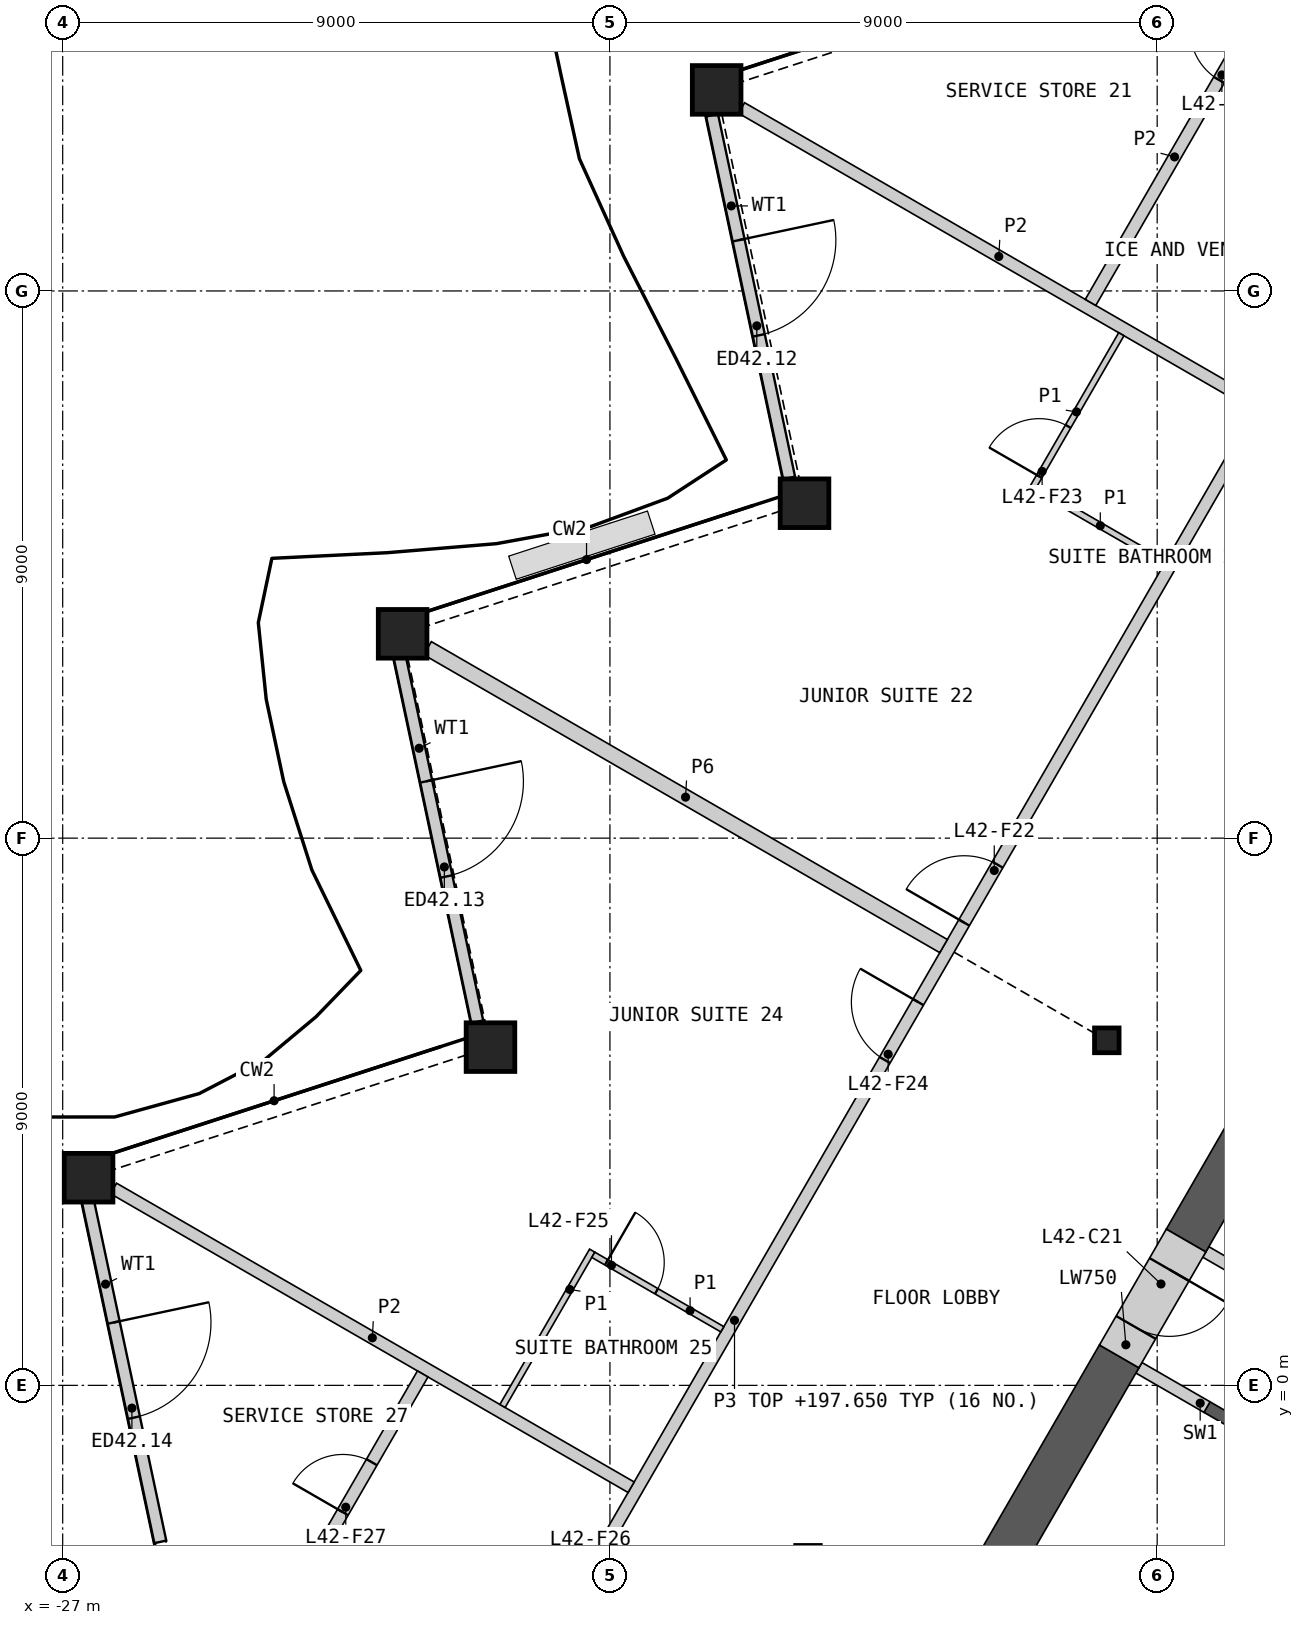
"""IFC4 building model, lengths in metres.
Left out: names, types, materials, properties, quantities, classifications, styles, units other than length and angle.
Written with IfcOpenShell. Run it as: python <this file> out.ifc"""

import sys

from ifc_helpers import new_model, si_unit, direction, frame, frame_2d, origin, origin_2d, place, context, subcontext, project, spatial, polyline, rectangle, hollow_rectangle, i_section, outline, extrude, element, fill, save


model = new_model("IFC4")
c1 = context("Model", 3, precision=1e-05, world=origin(), true_north=direction((0.0, 1.0)))
c2 = subcontext(c1, "Body", "Model", "MODEL_VIEW")
j1 = project(units=[si_unit("LENGTHUNIT", "METRE"), si_unit("PLANEANGLEUNIT", "RADIAN")], contexts=[c1])
p1 = place(None, origin())
s1 = spatial("IfcSite", under=j1, at=p1, CompositionType="ELEMENT")
p2 = place(p1, origin())
s2 = spatial("IfcBuilding", under=s1, at=p2, CompositionType="ELEMENT")
p3 = place(p2, frame((0.0, 0.0, 194.4)))
s3 = spatial("IfcBuildingStorey", under=s2, at=p3, CompositionType="ELEMENT", Elevation=194.4)
for number, where, z_axis, x_axis in (
    (1, (-16.245, 21.306, 0.0), (0.0, 0.0, 1.0), (1.0, 0.0, 0.0)),
    (2, (-14.8, 14.508, 0.0), (0.0, 0.0, 1.0), (1.0, 0.0, 0.0)),
    (3, (-21.409, 12.361, 0.0), (0.0, 0.0, 1.0), (1.0, 0.0, 0.0)),
    (4, (-19.965, 5.563, 0.0), (0.0, 0.0, 1.0), (1.0, 0.0, 0.0)),
    (5, (-26.574, 3.415, 0.0), (0.0, 0.0, 1.0), (1.0, 0.0, 0.0)),
):
    element("IfcColumn", number, at=place(p3, frame(where, z_axis=z_axis, x_axis=x_axis)), inside=s3, PredefinedType="COLUMN", context=c2, shape_type="SweptSolid", body=[
        extrude(hollow_rectangle(XDim=0.8, YDim=0.8, WallThickness=0.05, at=origin_2d()), origin(), (0.0, 0.0, 1.0), 3.6),
    ])
p4 = place(p3, frame((-9.828, 5.675, 0.0), z_axis=(0.0, 0.0, 1.0), x_axis=(1.0, 0.0, 0.0)))
e6 = element("IfcColumn", 6, at=p4, inside=s3, PredefinedType="COLUMN", context=c2, shape_type="SweptSolid", body=[
    extrude(i_section(OverallWidth=0.404, OverallDepth=0.407, WebThickness=0.027, FlangeThickness=0.044, at=origin_2d()), origin(), (0.0, 0.0, 1.0), 3.6),
])
p5 = place(p3, frame((-16.321, 20.89, 0.0), z_axis=(0.0, 0.0, 1.0), x_axis=(0.207912864597, -0.978147351238, 0.0)))
e7 = element("IfcWall", 7, at=p5, inside=s3, PredefinedType="SOLIDWALL", context=c2, shape_type="SweptSolid", body=[
    extrude(rectangle(XDim=6.098, YDim=0.2, at=frame_2d((3.049, 0.0))), origin(), (0.0, 0.0, 1.0), 2.701),
])
p6 = place(p5, frame((2.101, 0.0, 0.0)))
e8 = element("IfcOpeningElement", 8, at=p6, cuts=e7, PredefinedType="OPENING", context=c2, shape_type="SweptSolid", body=[
    extrude(rectangle(XDim=1.6, YDim=2.4, at=frame_2d((0.8, 1.2))), frame((0.0, 0.11, 0.0), z_axis=(0.0, -1.0, 0.0), x_axis=(1.0, 0.0, 0.0)), (0.0, 0.0, 1.0), 0.22),
])
p7 = place(p3, frame((-21.457, 11.978, 0.0), z_axis=(0.0, 0.0, 1.0), x_axis=(0.207930174887, -0.978143671641, 0.0)))
e9 = element("IfcWall", 9, at=p7, inside=s3, PredefinedType="SOLIDWALL", context=c2, shape_type="SweptSolid", body=[
    extrude(rectangle(XDim=6.133, YDim=0.2, at=frame_2d((3.066, 0.0))), origin(), (0.0, 0.0, 1.0), 2.701),
])
p8 = place(p7, frame((2.089, 0.0, 0.0)))
e10 = element("IfcOpeningElement", 10, at=p8, cuts=e9, PredefinedType="OPENING", context=c2, shape_type="SweptSolid", body=[
    extrude(rectangle(XDim=1.6, YDim=2.4, at=frame_2d((0.8, 1.2))), frame((0.0, 0.11, 0.0), z_axis=(0.0, -1.0, 0.0), x_axis=(1.0, 0.0, 0.0)), (0.0, 0.0, 1.0), 0.22),
])
p9 = place(p3, frame((-26.595, 3.078, 0.0), z_axis=(0.0, 0.0, 1.0), x_axis=(0.207907263894, -0.978148541695, 0.0)))
e11 = element("IfcWall", 11, at=p9, inside=s3, PredefinedType="SOLIDWALL", context=c2, shape_type="SweptSolid", body=[
    extrude(rectangle(XDim=5.779, YDim=0.2, at=frame_2d((2.889, 0.0))), origin(), (0.0, 0.0, 1.0), 2.701),
])
p10 = place(p9, frame((2.089, 0.0, 0.0)))
e12 = element("IfcOpeningElement", 12, at=p10, cuts=e11, PredefinedType="OPENING", context=c2, shape_type="SweptSolid", body=[
    extrude(rectangle(XDim=1.6, YDim=2.4, at=frame_2d((0.8, 1.2))), frame((0.0, 0.11, 0.0), z_axis=(0.0, -1.0, 0.0), x_axis=(1.0, 0.0, 0.0)), (0.0, 0.0, 1.0), 0.22),
])
p11 = place(p3, origin())
e13 = element("IfcWall", 13, at=p11, inside=s3, PredefinedType="SHEAR", context=c2, shape_type="SweptSolid", body=[
    extrude(outline(polyline([(-6.061, -1.697), (-8.231, -0.444), (-8.131, -0.271), (-5.96, -1.524), (-6.061, -1.697)])), origin(), (0.0, 0.0, 1.0), 3.25),
])
for number, where, z_axis, x_axis in (
    (14, (-7.081, 1.548, 0.0), (0.0, 0.0, 1.0), (-0.866, 0.5, 0.0)),
    (15, (-8.181, -0.357, 0.0), (0.0, 0.0, 1.0), (-0.866, 0.5, 0.0)),
):
    element("IfcWall", number, at=place(p3, frame(where, z_axis=z_axis, x_axis=x_axis)), inside=s3, PredefinedType="SHEAR", context=c2, shape_type="SweptSolid", body=[
        extrude(rectangle(XDim=1.293, YDim=0.2, at=frame_2d((0.646, 0.0))), origin(), (0.0, 0.0, 1.0), 3.25),
    ])
p12 = place(p3, origin())
e16 = element("IfcWall", 16, at=p12, inside=s3, PredefinedType="SHEAR", context=c2, shape_type="SweptSolid", body=[
    extrude(outline(polyline([(-5.307, -1.281), (-10.374, -4.206), (-10.032, -4.298), (-5.182, -1.498), (-5.307, -1.281)])), origin(), (0.0, 0.0, 1.0), 3.25),
])
p13 = place(p3, frame((-4.95, 8.574, 0.0), z_axis=(0.0, 0.0, 1.0), x_axis=(-0.499987463267, -0.866032641749, 0.0)))
e17 = element("IfcWall", 17, at=p13, inside=s3, PredefinedType="SHEAR", context=c2, shape_type="SweptSolid", body=[
    extrude(rectangle(XDim=7.151, YDim=0.75, at=frame_2d((3.575, 0.0))), origin(), (0.0, 0.0, 1.0), 3.25),
])
p14 = place(p3, frame((-9.625, 0.477, 0.0), z_axis=(0.0, 0.0, 1.0), x_axis=(-0.499951145694, -0.866053607994, 0.0)))
e18 = element("IfcWall", 18, at=p14, inside=s3, PredefinedType="SHEAR", context=c2, shape_type="SweptSolid", body=[
    extrude(rectangle(XDim=3.851, YDim=0.75, at=frame_2d((1.925, 0.0))), origin(), (0.0, 0.0, 1.0), 3.25),
])
p15 = place(p3, frame((-8.525, 2.382, 0.0), z_axis=(0.0, 0.0, 1.0), x_axis=(-0.500077893725, -0.86598042715, 0.0)))
e19 = element("IfcWall", 19, at=p15, inside=s3, PredefinedType="SHEAR", context=c2, shape_type="SweptSolid", body=[
    extrude(rectangle(XDim=2.2, YDim=0.75, at=frame_2d((1.1, 0.0))), origin(), (0.0, 0.0, 1.0), 3.25),
])
p16 = place(p15, frame((0.55, 0.0, 0.0)))
e20 = element("IfcOpeningElement", 20, at=p16, cuts=e19, PredefinedType="OPENING", context=c2, shape_type="SweptSolid", body=[
    extrude(rectangle(XDim=1.1, YDim=2.1, at=frame_2d((0.55, 1.05))), frame((0.0, 0.385, 0.0), z_axis=(0.0, -1.0, 0.0), x_axis=(1.0, 0.0, 0.0)), (0.0, 0.0, 1.0), 0.77),
])
p17 = place(p3, frame((-19.476, -5.035, 0.0), z_axis=(0.0, 0.0, 1.0), x_axis=(0.500000757641, 0.86602496636, 0.0)))
e21 = element("IfcWall", 21, at=p17, inside=s3, PredefinedType="PARTITIONING", context=c2, shape_type="SweptSolid", body=[
    extrude(rectangle(XDim=28.198, YDim=0.2, at=frame_2d((14.099, 0.0))), origin(), (0.0, 0.0, 1.0), 3.25),
])
p18 = place(p17, frame((25.796, 0.0, 0.0)))
e22 = element("IfcOpeningElement", 22, at=p18, cuts=e21, PredefinedType="OPENING", context=c2, shape_type="SweptSolid", body=[
    extrude(rectangle(XDim=0.95, YDim=2.1, at=frame_2d((0.475, 1.05))), frame((0.0, 0.11, 0.0), z_axis=(0.0, -1.0, 0.0), x_axis=(1.0, 0.0, 0.0)), (0.0, 0.0, 1.0), 0.22),
])
p19 = place(p17, frame((14.603, 0.0, 0.0)))
e23 = element("IfcOpeningElement", 23, at=p19, cuts=e21, PredefinedType="OPENING", context=c2, shape_type="SweptSolid", body=[
    extrude(rectangle(XDim=1.1, YDim=2.1, at=frame_2d((0.55, 1.05))), frame((0.0, 0.11, 0.0), z_axis=(0.0, -1.0, 0.0), x_axis=(1.0, 0.0, 0.0)), (0.0, 0.0, 1.0), 0.22),
])
p20 = place(p17, frame((11.993, 0.0, 0.0)))
e24 = element("IfcOpeningElement", 24, at=p20, cuts=e21, PredefinedType="OPENING", context=c2, shape_type="SweptSolid", body=[
    extrude(rectangle(XDim=1.1, YDim=2.1, at=frame_2d((0.55, 1.05))), frame((0.0, 0.11, 0.0), z_axis=(0.0, -1.0, 0.0), x_axis=(1.0, 0.0, 0.0)), (0.0, 0.0, 1.0), 0.22),
])
p21 = place(p17, frame((1.452, 0.0, 0.0)))
e25 = element("IfcOpeningElement", 25, at=p21, cuts=e21, PredefinedType="OPENING", context=c2, shape_type="SweptSolid", body=[
    extrude(rectangle(XDim=0.95, YDim=2.1, at=frame_2d((0.475, 1.05))), frame((0.0, 0.11, 0.0), z_axis=(0.0, -1.0, 0.0), x_axis=(1.0, 0.0, 0.0)), (0.0, 0.0, 1.0), 0.22),
])
p22 = place(p3, frame((-21.0, 12.124, 0.0), z_axis=(0.0, 0.0, 1.0), x_axis=(0.866032905446, -0.499987006516, 0.0)))
e26 = element("IfcWall", 26, at=p22, inside=s3, PredefinedType="PARTITIONING", context=c2, shape_type="SweptSolid", body=[
    extrude(rectangle(XDim=9.799, YDim=0.25, at=frame_2d((4.899, 0.0))), origin(), (0.0, 0.0, 1.0), 2.404),
])
p23 = place(p3, frame((-11.021, 29.57, 0.0), z_axis=(0.0, 0.0, 1.0), x_axis=(0.478233946204, -0.878232482147, 0.0)))
e27 = element("IfcWall", 27, at=p23, inside=s3, PredefinedType="PARTITIONING", context=c2, shape_type="SweptSolid", body=[
    extrude(rectangle(XDim=11.596, YDim=0.2, at=frame_2d((5.798, 0.0))), origin(), (0.0, 0.0, 1.0), 2.404),
])
p24 = place(p3, frame((-26.164, 3.239, 0.0), z_axis=(0.0, 0.0, 1.0), x_axis=(0.866025932773, -0.499999083763, 0.0)))
e28 = element("IfcWall", 28, at=p24, inside=s3, PredefinedType="PARTITIONING", context=c2, shape_type="SweptSolid", body=[
    extrude(rectangle(XDim=9.83, YDim=0.2, at=frame_2d((4.915, 0.0))), origin(), (0.0, 0.0, 1.0), 2.404),
])
p25 = place(p3, frame((-15.835, 21.009, 0.0), z_axis=(0.0, 0.0, 1.0), x_axis=(0.866024525919, -0.500001520505, 0.0)))
e29 = element("IfcWall", 29, at=p25, inside=s3, PredefinedType="PARTITIONING", context=c2, shape_type="SweptSolid", body=[
    extrude(rectangle(XDim=9.769, YDim=0.2, at=frame_2d((4.885, 0.0))), origin(), (0.0, 0.0, 1.0), 2.404),
])
p26 = place(p3, frame((-24.045, -4.949, 0.0), z_axis=(0.0, 0.0, 1.0), x_axis=(0.500016988964, 0.866015594979, 0.0)))
e30 = element("IfcWall", 30, at=p26, inside=s3, PredefinedType="PARTITIONING", context=c2, shape_type="SweptSolid", body=[
    extrude(rectangle(XDim=5.931, YDim=0.2, at=frame_2d((2.966, 0.0))), origin(), (0.0, 0.0, 1.0), 2.404),
])
p27 = place(p26, frame((3.305, 0.0, 0.0)))
e31 = element("IfcOpeningElement", 31, at=p27, cuts=e30, PredefinedType="OPENING", context=c2, shape_type="SweptSolid", body=[
    extrude(rectangle(XDim=0.95, YDim=2.1, at=frame_2d((0.475, 1.05))), frame((0.0, 0.11, 0.0), z_axis=(0.0, -1.0, 0.0), x_axis=(1.0, 0.0, 0.0)), (0.0, 0.0, 1.0), 0.22),
])
p28 = place(p3, frame((-10.096, 17.811, 0.0), z_axis=(0.0, 0.0, 1.0), x_axis=(0.500015590807, 0.866016402241, 0.0)))
e32 = element("IfcWall", 32, at=p28, inside=s3, PredefinedType="PARTITIONING", context=c2, shape_type="SweptSolid", body=[
    extrude(rectangle(XDim=5.527, YDim=0.2, at=frame_2d((2.764, 0.0))), origin(), (0.0, 0.0, 1.0), 2.404),
])
p29 = place(p28, frame((4.225, 0.0, 0.0)))
e33 = element("IfcOpeningElement", 33, at=p29, cuts=e32, PredefinedType="OPENING", context=c2, shape_type="SweptSolid", body=[
    extrude(rectangle(XDim=0.95, YDim=2.1, at=frame_2d((0.475, 1.05))), frame((0.0, 0.11, 0.0), z_axis=(0.0, -1.0, 0.0), x_axis=(1.0, 0.0, 0.0)), (0.0, 0.0, 1.0), 0.22),
])
p30 = place(p3, frame((-11.065, 14.733, 0.0), z_axis=(0.0, 0.0, 1.0), x_axis=(0.500037662692, 0.866003658127, 0.0)))
e34 = element("IfcWall", 34, at=p30, inside=s3, PredefinedType="PARTITIONING", context=c2, shape_type="SweptSolid", body=[
    extrude(rectangle(XDim=2.95, YDim=0.1, at=frame_2d((1.475, 0.0))), origin(), (0.0, 0.0, 1.0), 2.404),
])
p31 = place(p30, frame((0.25, 0.0, 0.0)))
e35 = element("IfcOpeningElement", 35, at=p31, cuts=e34, PredefinedType="OPENING", context=c2, shape_type="SweptSolid", body=[
    extrude(rectangle(XDim=0.95, YDim=2.1, at=frame_2d((0.475, 1.05))), frame((0.0, 0.06, 0.0), z_axis=(0.0, -1.0, 0.0), x_axis=(1.0, 0.0, 0.0)), (0.0, 0.0, 1.0), 0.12),
])
p32 = place(p3, frame((-19.767, -0.339, 0.0), z_axis=(0.0, 0.0, 1.0), x_axis=(0.499939757307, 0.866060182126, 0.0)))
e36 = element("IfcWall", 36, at=p32, inside=s3, PredefinedType="PARTITIONING", context=c2, shape_type="SweptSolid", body=[
    extrude(rectangle(XDim=2.95, YDim=0.1, at=frame_2d((1.475, 0.0))), origin(), (0.0, 0.0, 1.0), 2.404),
])
p33 = place(p3, frame((-10.996, 14.752, 0.0), z_axis=(0.0, 0.0, 1.0), x_axis=(0.866014668023, -0.500018594424, 0.0)))
e37 = element("IfcWall", 37, at=p33, inside=s3, PredefinedType="PARTITIONING", context=c2, shape_type="SweptSolid", body=[
    extrude(rectangle(XDim=2.45, YDim=0.1, at=frame_2d((1.225, 0.0))), origin(), (0.0, 0.0, 1.0), 2.404),
])
p34 = place(p3, frame((-18.273, 2.147, 0.0), z_axis=(0.0, 0.0, 1.0), x_axis=(0.866014668023, -0.500018594424, 0.0)))
e38 = element("IfcWall", 38, at=p34, inside=s3, PredefinedType="PARTITIONING", context=c2, shape_type="SweptSolid", body=[
    extrude(rectangle(XDim=2.45, YDim=0.1, at=frame_2d((1.225, 0.0))), origin(), (0.0, 0.0, 1.0), 2.404),
])
p35 = place(p34, frame((0.25, 0.0, 0.0)))
e39 = element("IfcOpeningElement", 39, at=p35, cuts=e38, PredefinedType="OPENING", context=c2, shape_type="SweptSolid", body=[
    extrude(rectangle(XDim=0.95, YDim=2.1, at=frame_2d((0.475, 1.05))), frame((0.0, 0.06, 0.0), z_axis=(0.0, -1.0, 0.0), x_axis=(1.0, 0.0, 0.0)), (0.0, 0.0, 1.0), 0.12),
])
p36 = place(p6, origin())
e40 = element("IfcDoor", 40, at=p36, inside=s3, OperationType="DOUBLE_DOOR_SINGLE_SWING", PredefinedType="DOOR", context=c2, shape_type="SweptSolid", body=[
    extrude(rectangle(XDim=1.6, YDim=2.4, at=frame_2d((0.8, 1.2))), frame((0.0, 0.025, 0.0), z_axis=(0.0, -1.0, 0.0), x_axis=(1.0, 0.0, 0.0)), (0.0, 0.0, 1.0), 0.05),
])
fill(e8, e40)
p37 = place(p8, origin())
e41 = element("IfcDoor", 41, at=p37, inside=s3, OperationType="DOUBLE_DOOR_SINGLE_SWING", PredefinedType="DOOR", context=c2, shape_type="SweptSolid", body=[
    extrude(rectangle(XDim=1.6, YDim=2.4, at=frame_2d((0.8, 1.2))), frame((0.0, 0.025, 0.0), z_axis=(0.0, -1.0, 0.0), x_axis=(1.0, 0.0, 0.0)), (0.0, 0.0, 1.0), 0.05),
])
fill(e10, e41)
p38 = place(p10, origin())
e42 = element("IfcDoor", 42, at=p38, inside=s3, OperationType="DOUBLE_DOOR_SINGLE_SWING", PredefinedType="DOOR", context=c2, shape_type="SweptSolid", body=[
    extrude(rectangle(XDim=1.6, YDim=2.4, at=frame_2d((0.8, 1.2))), frame((0.0, 0.025, 0.0), z_axis=(0.0, -1.0, 0.0), x_axis=(1.0, 0.0, 0.0)), (0.0, 0.0, 1.0), 0.05),
])
fill(e12, e42)
p39 = place(p16, origin())
e43 = element("IfcDoor", 43, at=p39, inside=s3, OperationType="SINGLE_SWING_LEFT", PredefinedType="DOOR", context=c2, shape_type="SweptSolid", body=[
    extrude(rectangle(XDim=1.1, YDim=2.1, at=frame_2d((0.55, 1.05))), frame((0.0, 0.13, 0.0), z_axis=(0.0, -1.0, 0.0), x_axis=(1.0, 0.0, 0.0)), (0.0, 0.0, 1.0), 0.05),
])
fill(e20, e43)
p40 = place(p29, origin())
e44 = element("IfcDoor", 44, at=p40, inside=s3, OperationType="SINGLE_SWING_RIGHT", PredefinedType="DOOR", context=c2, shape_type="SweptSolid", body=[
    extrude(rectangle(XDim=0.95, YDim=2.1, at=frame_2d((0.475, 1.05))), frame((0.0, 0.025, 0.0), z_axis=(0.0, -1.0, 0.0), x_axis=(1.0, 0.0, 0.0)), (0.0, 0.0, 1.0), 0.05),
])
fill(e33, e44)
p41 = place(p19, origin())
e45 = element("IfcDoor", 45, at=p41, inside=s3, OperationType="SINGLE_SWING_LEFT", PredefinedType="DOOR", context=c2, shape_type="SweptSolid", body=[
    extrude(rectangle(XDim=1.1, YDim=2.1, at=frame_2d((0.55, 1.05))), frame((0.0, 0.025, 0.0), z_axis=(0.0, -1.0, 0.0), x_axis=(1.0, 0.0, 0.0)), (0.0, 0.0, 1.0), 0.05),
])
fill(e23, e45)
p42 = place(p31, origin())
e46 = element("IfcDoor", 46, at=p42, inside=s3, OperationType="SINGLE_SWING_LEFT", PredefinedType="DOOR", context=c2, shape_type="SweptSolid", body=[
    extrude(rectangle(XDim=0.95, YDim=2.1, at=frame_2d((0.475, 1.05))), frame((0.0, 0.025, 0.0), z_axis=(0.0, -1.0, 0.0), x_axis=(1.0, 0.0, 0.0)), (0.0, 0.0, 1.0), 0.05),
])
fill(e35, e46)
p43 = place(p20, origin())
e47 = element("IfcDoor", 47, at=p43, inside=s3, OperationType="SINGLE_SWING_RIGHT", PredefinedType="DOOR", context=c2, shape_type="SweptSolid", body=[
    extrude(rectangle(XDim=1.1, YDim=2.1, at=frame_2d((0.55, 1.05))), frame((0.0, 0.025, 0.0), z_axis=(0.0, -1.0, 0.0), x_axis=(1.0, 0.0, 0.0)), (0.0, 0.0, 1.0), 0.05),
])
fill(e24, e47)
p44 = place(p35, origin())
e48 = element("IfcDoor", 48, at=p44, inside=s3, OperationType="SINGLE_SWING_LEFT", PredefinedType="DOOR", context=c2, shape_type="SweptSolid", body=[
    extrude(rectangle(XDim=0.95, YDim=2.1, at=frame_2d((0.475, 1.05))), frame((0.0, 0.025, 0.0), z_axis=(0.0, -1.0, 0.0), x_axis=(1.0, 0.0, 0.0)), (0.0, 0.0, 1.0), 0.05),
])
fill(e39, e48)
p45 = place(p27, origin())
e49 = element("IfcDoor", 49, at=p45, inside=s3, OperationType="SINGLE_SWING_LEFT", PredefinedType="DOOR", context=c2, shape_type="SweptSolid", body=[
    extrude(rectangle(XDim=0.95, YDim=2.1, at=frame_2d((0.475, 1.05))), frame((0.0, 0.025, 0.0), z_axis=(0.0, -1.0, 0.0), x_axis=(1.0, 0.0, 0.0)), (0.0, 0.0, 1.0), 0.05),
])
fill(e31, e49)
save(model, sys.argv[1])
